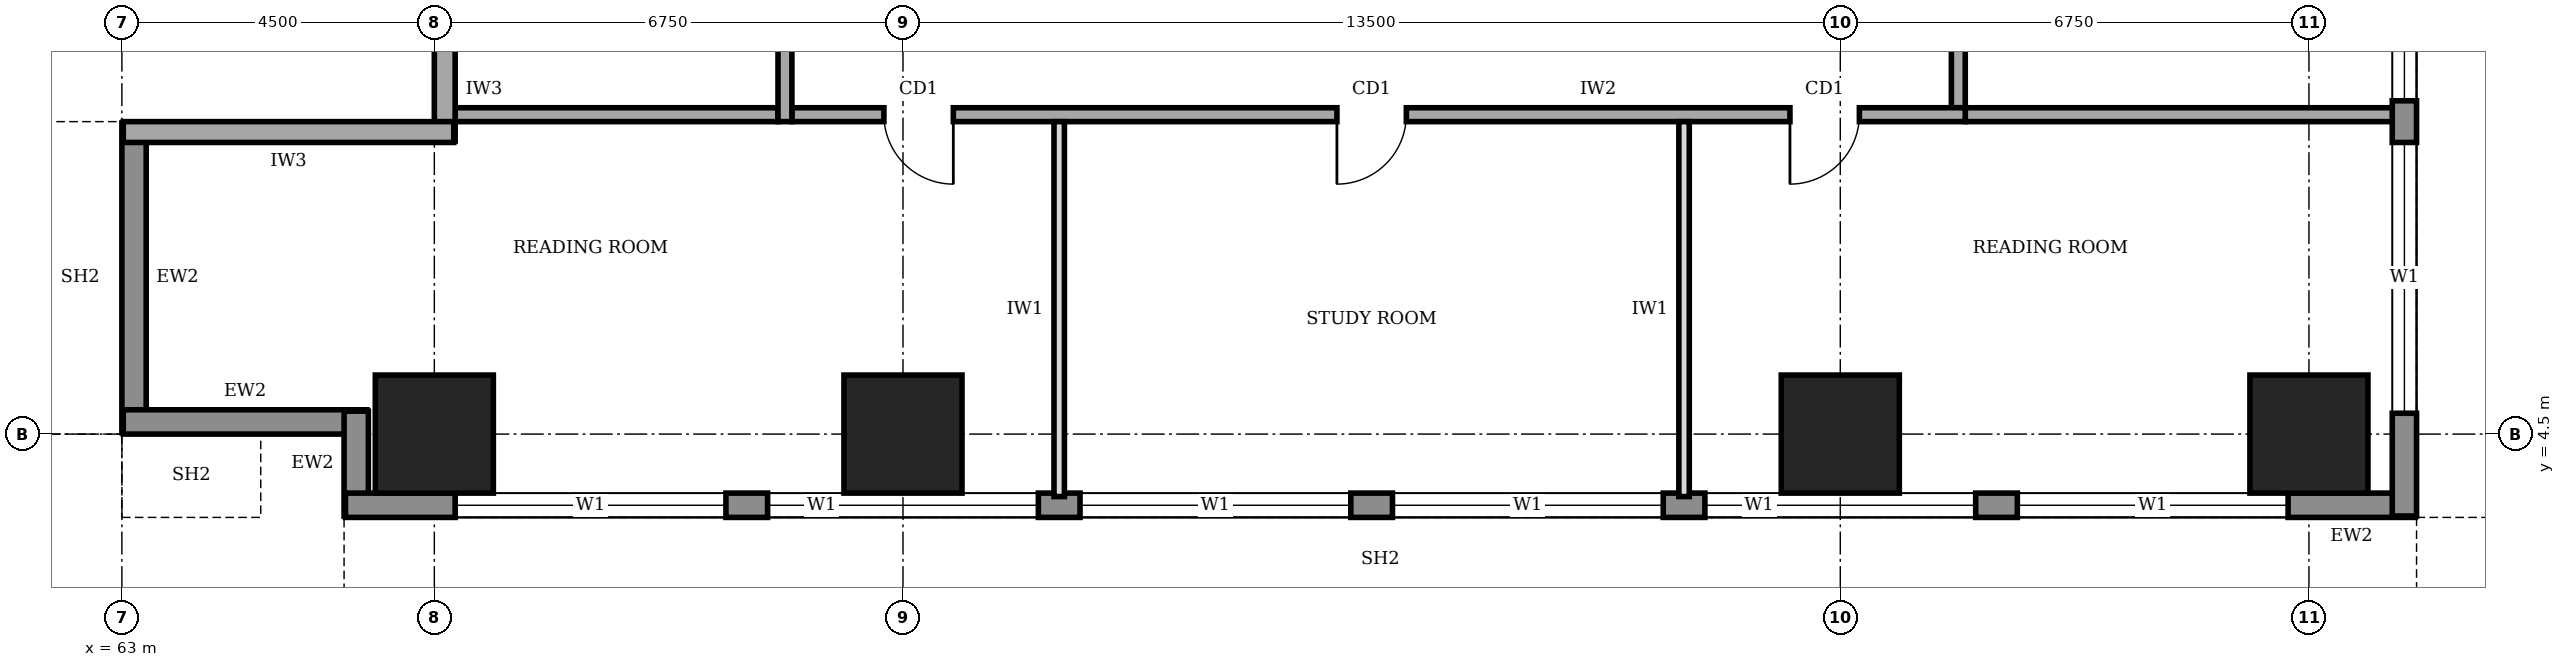
"""IFC4 building model, lengths in metres.
Left out: names, types, materials, properties, quantities, classifications, styles, units other than length and angle.
Written with IfcOpenShell. Run it as: python <this file> out.ifc"""

import sys

from ifc_helpers import new_model, si_unit, direction, frame, frame_2d, origin, origin_2d, place, context, subcontext, project, spatial, rectangle, extrude, element, fill, save


model = new_model("IFC4")
c1 = context("Model", 3, precision=1e-05, world=origin(), true_north=direction((0.0, 1.0)))
c2 = subcontext(c1, "Body", "Model", "MODEL_VIEW")
j1 = project(units=[si_unit("LENGTHUNIT", "METRE"), si_unit("PLANEANGLEUNIT", "RADIAN")], contexts=[c1])
p1 = place(None, origin())
s1 = spatial("IfcSite", under=j1, at=p1, CompositionType="ELEMENT")
p2 = place(p1, origin())
s2 = spatial("IfcBuilding", under=s1, at=p2, CompositionType="ELEMENT")
p3 = place(p2, frame((0.0, 0.0, 113.0)))
s3 = spatial("IfcBuildingStorey", under=s2, at=p3, CompositionType="ELEMENT", Elevation=113.0)
for number, where, z_axis, x_axis in (
    (1, (67.5, 4.5, 0.0), (0.0, 0.0, 1.0), (1.0, 0.0, 0.0)),
    (2, (74.25, 4.5, 0.0), (0.0, 0.0, 1.0), (1.0, 0.0, 0.0)),
    (3, (87.75, 4.5, 0.0), (0.0, 0.0, 1.0), (1.0, 0.0, 0.0)),
    (4, (94.5, 4.5, 0.0), (0.0, 0.0, 1.0), (1.0, 0.0, 0.0)),
):
    element("IfcColumn", number, at=place(p3, frame(where, z_axis=z_axis, x_axis=x_axis)), inside=s3, PredefinedType="COLUMN", context=c2, shape_type="SweptSolid", body=[
        extrude(rectangle(XDim=1.7, YDim=1.7, at=origin_2d()), origin(), (0.0, 0.0, 1.0), 4.0),
    ])
p4 = place(p3, frame((63.175, 8.98, 0.0), z_axis=(0.0, 0.0, 1.0), x_axis=(0.0, -1.0, 0.0)))
e5 = element("IfcWall", 5, at=p4, inside=s3, PredefinedType="STANDARD", context=c2, shape_type="SweptSolid", body=[
    extrude(rectangle(XDim=4.46, YDim=0.35, at=frame_2d((2.23, 0.0))), origin(), (0.0, 0.0, 1.0), 3.75),
])
p5 = place(p3, frame((63.02, 4.675, 0.0), z_axis=(0.0, 0.0, 1.0), x_axis=(1.0, 0.0, 0.0)))
e6 = element("IfcWall", 6, at=p5, inside=s3, PredefinedType="STANDARD", context=c2, shape_type="SweptSolid", body=[
    extrude(rectangle(XDim=3.51, YDim=0.35, at=frame_2d((1.755, 0.0))), origin(), (0.0, 0.0, 1.0), 2.85),
])
p6 = place(p3, frame((66.375, 4.83, 0.0), z_axis=(0.0, 0.0, 1.0), x_axis=(0.0, -1.0, 0.0)))
e7 = element("IfcWall", 7, at=p6, inside=s3, PredefinedType="STANDARD", context=c2, shape_type="SweptSolid", body=[
    extrude(rectangle(XDim=1.51, YDim=0.35, at=frame_2d((0.755, 0.0))), origin(), (0.0, 0.0, 1.0), 3.75),
])
p7 = place(p3, frame((66.22, 3.475, 0.0), z_axis=(0.0, 0.0, 1.0), x_axis=(1.0, 0.0, 0.0)))
e8 = element("IfcWall", 8, at=p7, inside=s3, PredefinedType="STANDARD", context=c2, shape_type="SweptSolid", body=[
    extrude(rectangle(XDim=29.81, YDim=0.35, at=frame_2d((14.905, 0.0))), origin(), (0.0, 0.0, 1.0), 3.75),
])
p8 = place(p7, frame((1.58, 0.0, 0.9)))
e9 = element("IfcOpeningElement", 9, at=p8, cuts=e8, PredefinedType="OPENING", context=c2, shape_type="SweptSolid", body=[
    extrude(rectangle(XDim=3.9, YDim=2.2, at=frame_2d((1.95, 1.1))), frame((0.0, 0.185, 0.0), z_axis=(0.0, -1.0, 0.0), x_axis=(1.0, 0.0, 0.0)), (0.0, 0.0, 1.0), 0.37),
])
p9 = place(p7, frame((6.08, 0.0, 0.9)))
e10 = element("IfcOpeningElement", 10, at=p9, cuts=e8, PredefinedType="OPENING", context=c2, shape_type="SweptSolid", body=[
    extrude(rectangle(XDim=3.9, YDim=2.2, at=frame_2d((1.95, 1.1))), frame((0.0, 0.185, 0.0), z_axis=(0.0, -1.0, 0.0), x_axis=(1.0, 0.0, 0.0)), (0.0, 0.0, 1.0), 0.37),
])
p10 = place(p7, frame((10.58, 0.0, 0.9)))
e11 = element("IfcOpeningElement", 11, at=p10, cuts=e8, PredefinedType="OPENING", context=c2, shape_type="SweptSolid", body=[
    extrude(rectangle(XDim=3.9, YDim=2.2, at=frame_2d((1.95, 1.1))), frame((0.0, 0.185, 0.0), z_axis=(0.0, -1.0, 0.0), x_axis=(1.0, 0.0, 0.0)), (0.0, 0.0, 1.0), 0.37),
])
p11 = place(p7, frame((15.08, 0.0, 0.9)))
e12 = element("IfcOpeningElement", 12, at=p11, cuts=e8, PredefinedType="OPENING", context=c2, shape_type="SweptSolid", body=[
    extrude(rectangle(XDim=3.9, YDim=2.2, at=frame_2d((1.95, 1.1))), frame((0.0, 0.185, 0.0), z_axis=(0.0, -1.0, 0.0), x_axis=(1.0, 0.0, 0.0)), (0.0, 0.0, 1.0), 0.37),
])
p12 = place(p7, frame((19.58, 0.0, 0.9)))
e13 = element("IfcOpeningElement", 13, at=p12, cuts=e8, PredefinedType="OPENING", context=c2, shape_type="SweptSolid", body=[
    extrude(rectangle(XDim=3.9, YDim=2.2, at=frame_2d((1.95, 1.1))), frame((0.0, 0.185, 0.0), z_axis=(0.0, -1.0, 0.0), x_axis=(1.0, 0.0, 0.0)), (0.0, 0.0, 1.0), 0.37),
])
p13 = place(p7, frame((24.08, 0.0, 0.9)))
e14 = element("IfcOpeningElement", 14, at=p13, cuts=e8, PredefinedType="OPENING", context=c2, shape_type="SweptSolid", body=[
    extrude(rectangle(XDim=3.9, YDim=2.2, at=frame_2d((1.95, 1.1))), frame((0.0, 0.185, 0.0), z_axis=(0.0, -1.0, 0.0), x_axis=(1.0, 0.0, 0.0)), (0.0, 0.0, 1.0), 0.37),
])
p14 = place(p3, frame((95.875, 3.32, 0.0), z_axis=(0.0, 0.0, 1.0), x_axis=(0.0, 1.0, 0.0)))
e15 = element("IfcWall", 15, at=p14, inside=s3, PredefinedType="STANDARD", context=c2, shape_type="SweptSolid", body=[
    extrude(rectangle(XDim=33.96, YDim=0.35, at=frame_2d((16.98, 0.0))), origin(), (0.0, 0.0, 1.0), 3.75),
])
p15 = place(p14, frame((1.48, 0.0, 0.9)))
e16 = element("IfcOpeningElement", 16, at=p15, cuts=e15, PredefinedType="OPENING", context=c2, shape_type="SweptSolid", body=[
    extrude(rectangle(XDim=3.9, YDim=2.2, at=frame_2d((1.95, 1.1))), frame((0.0, 0.185, 0.0), z_axis=(0.0, -1.0, 0.0), x_axis=(1.0, 0.0, 0.0)), (0.0, 0.0, 1.0), 0.37),
])
p16 = place(p14, frame((5.98, 0.0, 0.9)))
e17 = element("IfcOpeningElement", 17, at=p16, cuts=e15, PredefinedType="OPENING", context=c2, shape_type="SweptSolid", body=[
    extrude(rectangle(XDim=3.9, YDim=2.2, at=frame_2d((1.95, 1.1))), frame((0.0, 0.185, 0.0), z_axis=(0.0, -1.0, 0.0), x_axis=(1.0, 0.0, 0.0)), (0.0, 0.0, 1.0), 0.37),
])
p17 = place(p14, frame((10.48, 0.0, 0.9)))
e18 = element("IfcOpeningElement", 18, at=p17, cuts=e15, PredefinedType="OPENING", context=c2, shape_type="SweptSolid", body=[
    extrude(rectangle(XDim=3.9, YDim=2.2, at=frame_2d((1.95, 1.1))), frame((0.0, 0.185, 0.0), z_axis=(0.0, -1.0, 0.0), x_axis=(1.0, 0.0, 0.0)), (0.0, 0.0, 1.0), 0.37),
])
p18 = place(p14, frame((14.98, 0.0, 0.9)))
e19 = element("IfcOpeningElement", 19, at=p18, cuts=e15, PredefinedType="OPENING", context=c2, shape_type="SweptSolid", body=[
    extrude(rectangle(XDim=3.9, YDim=2.2, at=frame_2d((1.95, 1.1))), frame((0.0, 0.185, 0.0), z_axis=(0.0, -1.0, 0.0), x_axis=(1.0, 0.0, 0.0)), (0.0, 0.0, 1.0), 0.37),
])
p19 = place(p14, frame((19.48, 0.0, 0.9)))
e20 = element("IfcOpeningElement", 20, at=p19, cuts=e15, PredefinedType="OPENING", context=c2, shape_type="SweptSolid", body=[
    extrude(rectangle(XDim=3.9, YDim=2.2, at=frame_2d((1.95, 1.1))), frame((0.0, 0.185, 0.0), z_axis=(0.0, -1.0, 0.0), x_axis=(1.0, 0.0, 0.0)), (0.0, 0.0, 1.0), 0.37),
])
p20 = place(p14, frame((23.98, 0.0, 0.9)))
e21 = element("IfcOpeningElement", 21, at=p20, cuts=e15, PredefinedType="OPENING", context=c2, shape_type="SweptSolid", body=[
    extrude(rectangle(XDim=3.9, YDim=2.2, at=frame_2d((1.95, 1.1))), frame((0.0, 0.185, 0.0), z_axis=(0.0, -1.0, 0.0), x_axis=(1.0, 0.0, 0.0)), (0.0, 0.0, 1.0), 0.37),
])
p21 = place(p14, frame((28.48, 0.0, 0.9)))
e22 = element("IfcOpeningElement", 22, at=p21, cuts=e15, PredefinedType="OPENING", context=c2, shape_type="SweptSolid", body=[
    extrude(rectangle(XDim=3.9, YDim=2.2, at=frame_2d((1.95, 1.1))), frame((0.0, 0.185, 0.0), z_axis=(0.0, -1.0, 0.0), x_axis=(1.0, 0.0, 0.0)), (0.0, 0.0, 1.0), 0.37),
])
p22 = place(p3, frame((67.65, 10.2, 0.0), z_axis=(0.0, 0.0, 1.0), x_axis=(0.0, -1.0, 0.0)))
e23 = element("IfcWall", 23, at=p22, inside=s3, PredefinedType="SOLIDWALL", context=c2, shape_type="SweptSolid", body=[
    extrude(rectangle(XDim=1.48, YDim=0.3, at=frame_2d((0.74, 0.0))), origin(), (0.0, 0.0, 1.0), 2.65),
])
p23 = place(p3, frame((67.78, 8.85, 0.0), z_axis=(0.0, 0.0, 1.0), x_axis=(-1.0, 0.0, 0.0)))
e24 = element("IfcWall", 24, at=p23, inside=s3, PredefinedType="SOLIDWALL", context=c2, shape_type="SweptSolid", body=[
    extrude(rectangle(XDim=4.76, YDim=0.3, at=frame_2d((2.38, 0.0))), origin(), (0.0, 0.0, 1.0), 3.75),
])
p24 = place(p3, frame((72.65, 9.1, 0.0), z_axis=(0.0, 0.0, 1.0), x_axis=(1.0, 0.0, 0.0)))
e25 = element("IfcWall", 25, at=p24, inside=s3, PredefinedType="SOLIDWALL", context=c2, shape_type="SweptSolid", body=[
    extrude(rectangle(XDim=16.9, YDim=0.2, at=frame_2d((8.45, 0.0))), origin(), (0.0, 0.0, 1.0), 3.75),
])
p25 = place(p24, frame((1.325, 0.0, 0.0)))
e26 = element("IfcOpeningElement", 26, at=p25, cuts=e25, PredefinedType="OPENING", context=c2, shape_type="SweptSolid", body=[
    extrude(rectangle(XDim=1.0, YDim=2.1, at=frame_2d((0.5, 1.05))), frame((0.0, 0.11, 0.0), z_axis=(0.0, -1.0, 0.0), x_axis=(1.0, 0.0, 0.0)), (0.0, 0.0, 1.0), 0.22),
])
p26 = place(p24, frame((7.85, 0.0, 0.0)))
e27 = element("IfcOpeningElement", 27, at=p26, cuts=e25, PredefinedType="OPENING", context=c2, shape_type="SweptSolid", body=[
    extrude(rectangle(XDim=1.0, YDim=2.1, at=frame_2d((0.5, 1.05))), frame((0.0, 0.11, 0.0), z_axis=(0.0, -1.0, 0.0), x_axis=(1.0, 0.0, 0.0)), (0.0, 0.0, 1.0), 0.22),
])
p27 = place(p24, frame((14.375, 0.0, 0.0)))
e28 = element("IfcOpeningElement", 28, at=p27, cuts=e25, PredefinedType="OPENING", context=c2, shape_type="SweptSolid", body=[
    extrude(rectangle(XDim=1.0, YDim=2.1, at=frame_2d((0.5, 1.05))), frame((0.0, 0.11, 0.0), z_axis=(0.0, -1.0, 0.0), x_axis=(1.0, 0.0, 0.0)), (0.0, 0.0, 1.0), 0.22),
])
p28 = place(p3, frame((89.45, 9.2, 0.0), z_axis=(0.0, 0.0, 1.0), x_axis=(0.0, 1.0, 0.0)))
e29 = element("IfcWall", 29, at=p28, inside=s3, PredefinedType="SOLIDWALL", context=c2, shape_type="SweptSolid", body=[
    extrude(rectangle(XDim=23.8, YDim=0.2, at=frame_2d((11.9, 0.0))), origin(), (0.0, 0.0, 1.0), 3.75),
])
p29 = place(p28, frame((1.625, 0.0, 0.0)))
e30 = element("IfcOpeningElement", 30, at=p29, cuts=e29, PredefinedType="OPENING", context=c2, shape_type="SweptSolid", body=[
    extrude(rectangle(XDim=1.0, YDim=2.1, at=frame_2d((0.5, 1.05))), frame((0.0, 0.11, 0.0), z_axis=(0.0, -1.0, 0.0), x_axis=(1.0, 0.0, 0.0)), (0.0, 0.0, 1.0), 0.22),
])
p30 = place(p28, frame((5.625, 0.0, 0.0)))
e31 = element("IfcOpeningElement", 31, at=p30, cuts=e29, PredefinedType="OPENING", context=c2, shape_type="SweptSolid", body=[
    extrude(rectangle(XDim=0.9, YDim=2.1, at=frame_2d((0.45, 1.05))), frame((0.0, 0.11, 0.0), z_axis=(0.0, -1.0, 0.0), x_axis=(1.0, 0.0, 0.0)), (0.0, 0.0, 1.0), 0.22),
])
p31 = place(p28, frame((10.35, 0.0, 0.0)))
e32 = element("IfcOpeningElement", 32, at=p31, cuts=e29, PredefinedType="OPENING", context=c2, shape_type="SweptSolid", body=[
    extrude(rectangle(XDim=0.9, YDim=2.1, at=frame_2d((0.45, 1.05))), frame((0.0, 0.11, 0.0), z_axis=(0.0, -1.0, 0.0), x_axis=(1.0, 0.0, 0.0)), (0.0, 0.0, 1.0), 0.22),
])
p32 = place(p28, frame((13.325, 0.0, 0.0)))
e33 = element("IfcOpeningElement", 33, at=p32, cuts=e29, PredefinedType="OPENING", context=c2, shape_type="SweptSolid", body=[
    extrude(rectangle(XDim=0.9, YDim=2.1, at=frame_2d((0.45, 1.05))), frame((0.0, 0.11, 0.0), z_axis=(0.0, -1.0, 0.0), x_axis=(1.0, 0.0, 0.0)), (0.0, 0.0, 1.0), 0.22),
])
p33 = place(p28, frame((16.15, 0.0, 0.0)))
e34 = element("IfcOpeningElement", 34, at=p33, cuts=e29, PredefinedType="OPENING", context=c2, shape_type="SweptSolid", body=[
    extrude(rectangle(XDim=1.0, YDim=2.1, at=frame_2d((0.5, 1.05))), frame((0.0, 0.11, 0.0), z_axis=(0.0, -1.0, 0.0), x_axis=(1.0, 0.0, 0.0)), (0.0, 0.0, 1.0), 0.22),
])
p34 = place(p28, frame((8.2, 0.0, 0.0)))
e35 = element("IfcOpeningElement", 35, at=p34, cuts=e29, PredefinedType="OPENING", context=c2, shape_type="SweptSolid", body=[
    extrude(rectangle(XDim=1.0, YDim=2.1, at=frame_2d((0.5, 1.05))), frame((0.0, 0.11, 0.0), z_axis=(0.0, -1.0, 0.0), x_axis=(1.0, 0.0, 0.0)), (0.0, 0.0, 1.0), 0.22),
])
p35 = place(p28, frame((20.225, 0.0, 0.0)))
e36 = element("IfcOpeningElement", 36, at=p35, cuts=e29, PredefinedType="OPENING", context=c2, shape_type="SweptSolid", body=[
    extrude(rectangle(XDim=1.0, YDim=2.1, at=frame_2d((0.5, 1.05))), frame((0.0, 0.11, 0.0), z_axis=(0.0, -1.0, 0.0), x_axis=(1.0, 0.0, 0.0)), (0.0, 0.0, 1.0), 0.22),
])
p36 = place(p3, frame((72.55, 32.8, 0.0), z_axis=(0.0, 0.0, 1.0), x_axis=(0.0, -1.0, 0.0)))
e37 = element("IfcWall", 37, at=p36, inside=s3, PredefinedType="SOLIDWALL", context=c2, shape_type="SweptSolid", body=[
    extrude(rectangle(XDim=23.8, YDim=0.2, at=frame_2d((11.9, 0.0))), origin(), (0.0, 0.0, 1.0), 3.75),
])
p37 = place(p36, frame((10.9, 0.0, 0.0)))
e38 = element("IfcOpeningElement", 38, at=p37, cuts=e37, PredefinedType="OPENING", context=c2, shape_type="SweptSolid", body=[
    extrude(rectangle(XDim=1.8, YDim=2.1, at=frame_2d((0.9, 1.05))), frame((0.0, 0.11, 0.0), z_axis=(0.0, -1.0, 0.0), x_axis=(1.0, 0.0, 0.0)), (0.0, 0.0, 1.0), 0.22),
])
p38 = place(p3, frame((67.8, 9.1, 0.0), z_axis=(0.0, 0.0, 1.0), x_axis=(1.0, 0.0, 0.0)))
e39 = element("IfcWall", 39, at=p38, inside=s3, PredefinedType="SOLIDWALL", context=c2, shape_type="SweptSolid", body=[
    extrude(rectangle(XDim=4.65, YDim=0.2, at=frame_2d((2.325, 0.0))), origin(), (0.0, 0.0, 1.0), 3.75),
])
p39 = place(p3, frame((89.55, 9.1, 0.0), z_axis=(0.0, 0.0, 1.0), x_axis=(1.0, 0.0, 0.0)))
e40 = element("IfcWall", 40, at=p39, inside=s3, PredefinedType="SOLIDWALL", context=c2, shape_type="SweptSolid", body=[
    extrude(rectangle(XDim=6.2, YDim=0.2, at=frame_2d((3.1, 0.0))), origin(), (0.0, 0.0, 1.0), 3.75),
])
for number, where, z_axis, x_axis in (
    (41, (76.5, 3.6, 0.0), (0.0, 0.0, 1.0), (0.0, 1.0, 0.0)),
    (42, (85.5, 3.6, 0.0), (0.0, 0.0, 1.0), (0.0, 1.0, 0.0)),
):
    element("IfcWall", number, at=place(p3, frame(where, z_axis=z_axis, x_axis=x_axis)), inside=s3, PredefinedType="PARTITIONING", context=c2, shape_type="SweptSolid", body=[
        extrude(rectangle(XDim=5.4, YDim=0.15, at=frame_2d((2.7, 0.0))), origin(), (0.0, 0.0, 1.0), 3.75),
    ])
p40 = place(p8, origin())
e43 = element("IfcWindow", 43, at=p40, inside=s3, PartitioningType="SINGLE_PANEL", PredefinedType="WINDOW", context=c2, shape_type="SweptSolid", body=[
    extrude(rectangle(XDim=3.9, YDim=2.2, at=frame_2d((1.95, 1.1))), frame((0.0, 0.03, 0.0), z_axis=(0.0, -1.0, 0.0), x_axis=(1.0, 0.0, 0.0)), (0.0, 0.0, 1.0), 0.06),
])
fill(e9, e43)
p41 = place(p9, origin())
e44 = element("IfcWindow", 44, at=p41, inside=s3, PartitioningType="SINGLE_PANEL", PredefinedType="WINDOW", context=c2, shape_type="SweptSolid", body=[
    extrude(rectangle(XDim=3.9, YDim=2.2, at=frame_2d((1.95, 1.1))), frame((0.0, 0.03, 0.0), z_axis=(0.0, -1.0, 0.0), x_axis=(1.0, 0.0, 0.0)), (0.0, 0.0, 1.0), 0.06),
])
fill(e10, e44)
p42 = place(p10, origin())
e45 = element("IfcWindow", 45, at=p42, inside=s3, PartitioningType="SINGLE_PANEL", PredefinedType="WINDOW", context=c2, shape_type="SweptSolid", body=[
    extrude(rectangle(XDim=3.9, YDim=2.2, at=frame_2d((1.95, 1.1))), frame((0.0, 0.03, 0.0), z_axis=(0.0, -1.0, 0.0), x_axis=(1.0, 0.0, 0.0)), (0.0, 0.0, 1.0), 0.06),
])
fill(e11, e45)
p43 = place(p11, origin())
e46 = element("IfcWindow", 46, at=p43, inside=s3, PartitioningType="SINGLE_PANEL", PredefinedType="WINDOW", context=c2, shape_type="SweptSolid", body=[
    extrude(rectangle(XDim=3.9, YDim=2.2, at=frame_2d((1.95, 1.1))), frame((0.0, 0.03, 0.0), z_axis=(0.0, -1.0, 0.0), x_axis=(1.0, 0.0, 0.0)), (0.0, 0.0, 1.0), 0.06),
])
fill(e12, e46)
p44 = place(p12, origin())
e47 = element("IfcWindow", 47, at=p44, inside=s3, PartitioningType="SINGLE_PANEL", PredefinedType="WINDOW", context=c2, shape_type="SweptSolid", body=[
    extrude(rectangle(XDim=3.9, YDim=2.2, at=frame_2d((1.95, 1.1))), frame((0.0, 0.03, 0.0), z_axis=(0.0, -1.0, 0.0), x_axis=(1.0, 0.0, 0.0)), (0.0, 0.0, 1.0), 0.06),
])
fill(e13, e47)
p45 = place(p13, origin())
e48 = element("IfcWindow", 48, at=p45, inside=s3, PartitioningType="SINGLE_PANEL", PredefinedType="WINDOW", context=c2, shape_type="SweptSolid", body=[
    extrude(rectangle(XDim=3.9, YDim=2.2, at=frame_2d((1.95, 1.1))), frame((0.0, 0.03, 0.0), z_axis=(0.0, -1.0, 0.0), x_axis=(1.0, 0.0, 0.0)), (0.0, 0.0, 1.0), 0.06),
])
fill(e14, e48)
p46 = place(p15, origin())
e49 = element("IfcWindow", 49, at=p46, inside=s3, PartitioningType="SINGLE_PANEL", PredefinedType="WINDOW", context=c2, shape_type="SweptSolid", body=[
    extrude(rectangle(XDim=3.9, YDim=2.2, at=frame_2d((1.95, 1.1))), frame((0.0, 0.03, 0.0), z_axis=(0.0, -1.0, 0.0), x_axis=(1.0, 0.0, 0.0)), (0.0, 0.0, 1.0), 0.06),
])
fill(e16, e49)
p47 = place(p16, origin())
e50 = element("IfcWindow", 50, at=p47, inside=s3, PartitioningType="SINGLE_PANEL", PredefinedType="WINDOW", context=c2, shape_type="SweptSolid", body=[
    extrude(rectangle(XDim=3.9, YDim=2.2, at=frame_2d((1.95, 1.1))), frame((0.0, 0.03, 0.0), z_axis=(0.0, -1.0, 0.0), x_axis=(1.0, 0.0, 0.0)), (0.0, 0.0, 1.0), 0.06),
])
fill(e17, e50)
p48 = place(p25, frame((1.0, 0.0, 0.0), z_axis=(0.0, 0.0, 1.0), x_axis=(-1.0, 0.0, 0.0)))
e51 = element("IfcDoor", 51, at=p48, inside=s3, OperationType="SINGLE_SWING_LEFT", PredefinedType="DOOR", context=c2, shape_type="SweptSolid", body=[
    extrude(rectangle(XDim=1.0, YDim=2.1, at=frame_2d((0.5, 1.05))), frame((0.0, 0.025, 0.0), z_axis=(0.0, -1.0, 0.0), x_axis=(1.0, 0.0, 0.0)), (0.0, 0.0, 1.0), 0.05),
])
fill(e26, e51)
p49 = place(p26, frame((1.0, 0.0, 0.0), z_axis=(0.0, 0.0, 1.0), x_axis=(-1.0, 0.0, 0.0)))
e52 = element("IfcDoor", 52, at=p49, inside=s3, OperationType="SINGLE_SWING_RIGHT", PredefinedType="DOOR", context=c2, shape_type="SweptSolid", body=[
    extrude(rectangle(XDim=1.0, YDim=2.1, at=frame_2d((0.5, 1.05))), frame((0.0, 0.025, 0.0), z_axis=(0.0, -1.0, 0.0), x_axis=(1.0, 0.0, 0.0)), (0.0, 0.0, 1.0), 0.05),
])
fill(e27, e52)
p50 = place(p27, frame((1.0, 0.0, 0.0), z_axis=(0.0, 0.0, 1.0), x_axis=(-1.0, 0.0, 0.0)))
e53 = element("IfcDoor", 53, at=p50, inside=s3, OperationType="SINGLE_SWING_RIGHT", PredefinedType="DOOR", context=c2, shape_type="SweptSolid", body=[
    extrude(rectangle(XDim=1.0, YDim=2.1, at=frame_2d((0.5, 1.05))), frame((0.0, 0.025, 0.0), z_axis=(0.0, -1.0, 0.0), x_axis=(1.0, 0.0, 0.0)), (0.0, 0.0, 1.0), 0.05),
])
fill(e28, e53)
save(model, sys.argv[1])
